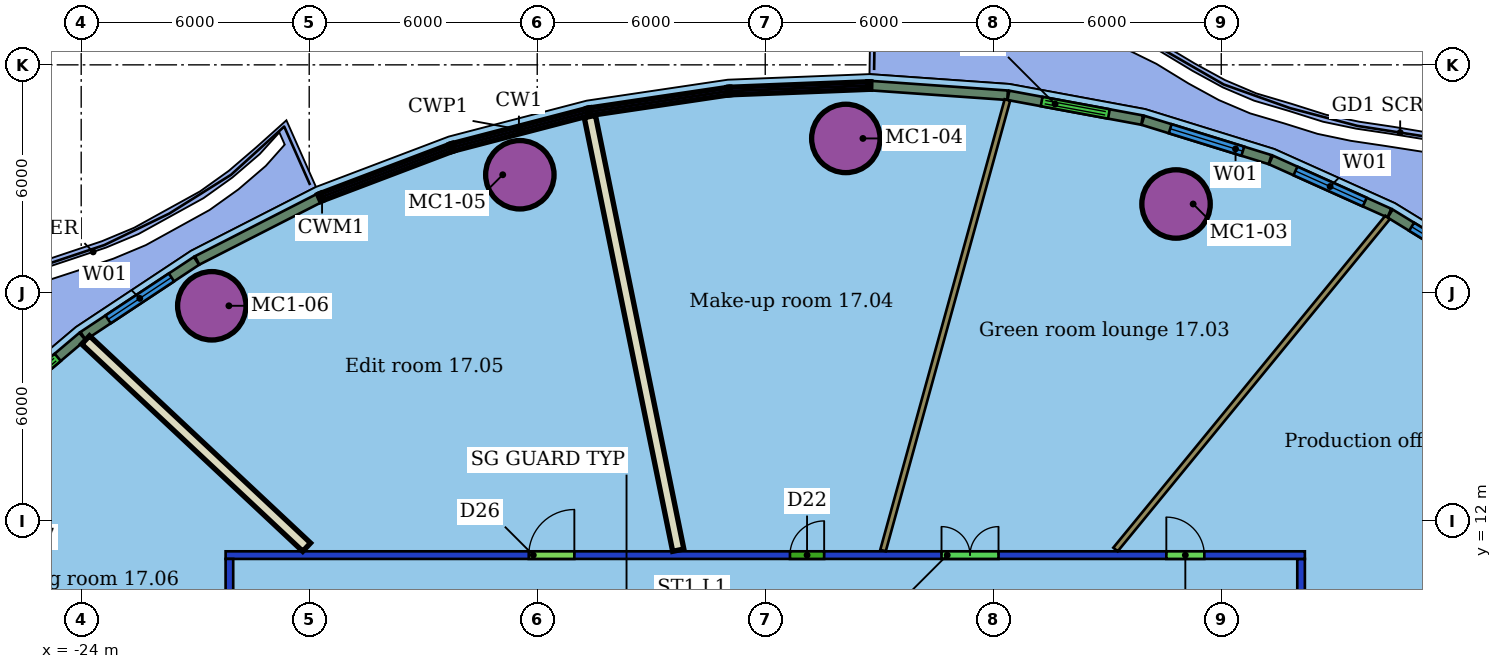
"""IFC4 building model, lengths in metres.
Left out: names, types, materials, properties, quantities, classifications, styles, units other than length and angle.
Written with IfcOpenShell. Run it as: python <this file> out.ifc"""

import sys

from ifc_helpers import new_model, si_unit, direction, frame, frame_2d, origin, origin_2d, place, context, subcontext, project, spatial, rectangle, hollow_circle, extrude, element, fill, save


model = new_model("IFC4")
c1 = context("Model", 3, precision=1e-05, world=origin(), true_north=direction((0.0, 1.0)))
c2 = subcontext(c1, "Body", "Model", "MODEL_VIEW")
j1 = project(units=[si_unit("LENGTHUNIT", "METRE"), si_unit("PLANEANGLEUNIT", "RADIAN")], contexts=[c1])
p1 = place(None, origin())
s1 = spatial("IfcSite", under=j1, at=p1, CompositionType="ELEMENT")
p2 = place(p1, origin())
s2 = spatial("IfcBuilding", under=s1, at=p2, CompositionType="ELEMENT")
p3 = place(p2, frame((0.0, 0.0, 80.4)))
s3 = spatial("IfcBuildingStorey", under=s2, at=p3, CompositionType="ELEMENT", Elevation=80.4)
for number, where, z_axis, x_axis in (
    (1, (4.81, 20.339, 0.0), (0.0, 0.0, 1.0), (1.0, 0.0, 0.0)),
    (2, (-3.879, 22.064, 0.0), (0.0, 0.0, 1.0), (1.0, 0.0, 0.0)),
    (3, (-12.458, 21.108, 0.0), (0.0, 0.0, 1.0), (1.0, 0.0, 0.0)),
    (4, (-20.563, 17.66, 0.0), (0.0, 0.0, 1.0), (1.0, 0.0, 0.0)),
):
    element("IfcColumn", number, at=place(p3, frame(where, z_axis=z_axis, x_axis=x_axis)), inside=s3, PredefinedType="COLUMN", context=c2, shape_type="SweptSolid", body=[
        extrude(hollow_circle(Radius=0.9, WallThickness=0.06, at=origin_2d()), origin(), (0.0, 0.0, 1.0), 3.5),
    ])
p4 = place(p3, frame((-20.1, -11.0, 0.0), z_axis=(0.0, 0.0, 1.0), x_axis=(0.0, 1.0, 0.0)))
e5 = element("IfcWall", 5, at=p4, inside=s3, PredefinedType="PARTITIONING", context=c2, shape_type="SweptSolid", body=[
    extrude(rectangle(XDim=22.0, YDim=0.2, at=frame_2d((11.0, 0.0))), origin(), (0.0, 0.0, 1.0), 2.8),
])
p5 = place(p4, frame((18.0, 0.0, 0.0)))
e6 = element("IfcOpeningElement", 6, at=p5, cuts=e5, PredefinedType="OPENING", context=c2, shape_type="SweptSolid", body=[
    extrude(rectangle(XDim=0.9, YDim=2.1, at=frame_2d((0.45, 1.05))), frame((0.0, 0.11, 0.0), z_axis=(0.0, -1.0, 0.0), x_axis=(1.0, 0.0, 0.0)), (0.0, 0.0, 1.0), 0.22),
])
p6 = place(p4, frame((13.798, 0.0, 0.0)))
e7 = element("IfcOpeningElement", 7, at=p6, cuts=e5, PredefinedType="OPENING", context=c2, shape_type="SweptSolid", body=[
    extrude(rectangle(XDim=1.1, YDim=2.1, at=frame_2d((0.55, 1.05))), frame((0.0, 0.11, 0.0), z_axis=(0.0, -1.0, 0.0), x_axis=(1.0, 0.0, 0.0)), (0.0, 0.0, 1.0), 0.22),
])
p7 = place(p4, frame((8.872, 0.0, 0.0)))
e8 = element("IfcOpeningElement", 8, at=p7, cuts=e5, PredefinedType="OPENING", context=c2, shape_type="SweptSolid", body=[
    extrude(rectangle(XDim=1.2, YDim=2.1, at=frame_2d((0.6, 1.05))), frame((0.0, 0.11, 0.0), z_axis=(0.0, -1.0, 0.0), x_axis=(1.0, 0.0, 0.0)), (0.0, 0.0, 1.0), 0.22),
])
p8 = place(p4, frame((5.6, 0.0, 0.0)))
e9 = element("IfcOpeningElement", 9, at=p8, cuts=e5, PredefinedType="OPENING", context=c2, shape_type="SweptSolid", body=[
    extrude(rectangle(XDim=1.0, YDim=2.1, at=frame_2d((0.5, 1.05))), frame((0.0, 0.11, 0.0), z_axis=(0.0, -1.0, 0.0), x_axis=(1.0, 0.0, 0.0)), (0.0, 0.0, 1.0), 0.22),
])
p9 = place(p3, frame((-20.2, 11.1, 0.0), z_axis=(0.0, 0.0, 1.0), x_axis=(1.0, 0.0, 0.0)))
e10 = element("IfcWall", 10, at=p9, inside=s3, PredefinedType="PARTITIONING", context=c2, shape_type="SweptSolid", body=[
    extrude(rectangle(XDim=28.4, YDim=0.2, at=frame_2d((14.2, 0.0))), origin(), (0.0, 0.0, 1.0), 2.8),
])
p10 = place(p9, frame((24.754, 0.0, 0.0)))
e11 = element("IfcOpeningElement", 11, at=p10, cuts=e10, PredefinedType="OPENING", context=c2, shape_type="SweptSolid", body=[
    extrude(rectangle(XDim=1.0, YDim=2.1, at=frame_2d((0.5, 1.05))), frame((0.0, 0.11, 0.0), z_axis=(0.0, -1.0, 0.0), x_axis=(1.0, 0.0, 0.0)), (0.0, 0.0, 1.0), 0.22),
])
p11 = place(p9, frame((18.838, 0.0, 0.0)))
e12 = element("IfcOpeningElement", 12, at=p11, cuts=e10, PredefinedType="OPENING", context=c2, shape_type="SweptSolid", body=[
    extrude(rectangle(XDim=1.5, YDim=2.1, at=frame_2d((0.75, 1.05))), frame((0.0, 0.11, 0.0), z_axis=(0.0, -1.0, 0.0), x_axis=(1.0, 0.0, 0.0)), (0.0, 0.0, 1.0), 0.22),
])
p12 = place(p9, frame((14.85, 0.0, 0.0)))
e13 = element("IfcOpeningElement", 13, at=p12, cuts=e10, PredefinedType="OPENING", context=c2, shape_type="SweptSolid", body=[
    extrude(rectangle(XDim=0.9, YDim=2.1, at=frame_2d((0.45, 1.05))), frame((0.0, 0.11, 0.0), z_axis=(0.0, -1.0, 0.0), x_axis=(1.0, 0.0, 0.0)), (0.0, 0.0, 1.0), 0.22),
])
p13 = place(p9, frame((7.977, 0.0, 0.0)))
e14 = element("IfcOpeningElement", 14, at=p13, cuts=e10, PredefinedType="OPENING", context=c2, shape_type="SweptSolid", body=[
    extrude(rectangle(XDim=1.2, YDim=2.1, at=frame_2d((0.6, 1.05))), frame((0.0, 0.11, 0.0), z_axis=(0.0, -1.0, 0.0), x_axis=(1.0, 0.0, 0.0)), (0.0, 0.0, 1.0), 0.22),
])
p14 = place(p3, frame((8.1, 11.0, 0.0), z_axis=(0.0, 0.0, 1.0), x_axis=(0.0, -1.0, 0.0)))
e15 = element("IfcWall", 15, at=p14, inside=s3, PredefinedType="PARTITIONING", context=c2, shape_type="SweptSolid", body=[
    extrude(rectangle(XDim=22.0, YDim=0.2, at=frame_2d((11.0, 0.0))), origin(), (0.0, 0.0, 1.0), 2.8),
])
p15 = place(p14, frame((5.63, 0.0, 0.0)))
e16 = element("IfcOpeningElement", 16, at=p15, cuts=e15, PredefinedType="OPENING", context=c2, shape_type="SweptSolid", body=[
    extrude(rectangle(XDim=1.0, YDim=2.1, at=frame_2d((0.5, 1.05))), frame((0.0, 0.11, 0.0), z_axis=(0.0, -1.0, 0.0), x_axis=(1.0, 0.0, 0.0)), (0.0, 0.0, 1.0), 0.22),
])
p16 = place(p14, frame((16.523, 0.0, 0.0)))
e17 = element("IfcOpeningElement", 17, at=p16, cuts=e15, PredefinedType="OPENING", context=c2, shape_type="SweptSolid", body=[
    extrude(rectangle(XDim=1.5, YDim=2.1, at=frame_2d((0.75, 1.05))), frame((0.0, 0.11, 0.0), z_axis=(0.0, -1.0, 0.0), x_axis=(1.0, 0.0, 0.0)), (0.0, 0.0, 1.0), 0.22),
])
p17 = place(p14, frame((12.501, 0.0, 0.0)))
e18 = element("IfcOpeningElement", 18, at=p17, cuts=e15, PredefinedType="OPENING", context=c2, shape_type="SweptSolid", body=[
    extrude(rectangle(XDim=1.1, YDim=2.1, at=frame_2d((0.55, 1.05))), frame((0.0, 0.11, 0.0), z_axis=(0.0, -1.0, 0.0), x_axis=(1.0, 0.0, 0.0)), (0.0, 0.0, 1.0), 0.22),
])
p18 = place(p14, frame((8.782, 0.0, 0.0)))
e19 = element("IfcOpeningElement", 19, at=p18, cuts=e15, PredefinedType="OPENING", context=c2, shape_type="SweptSolid", body=[
    extrude(rectangle(XDim=1.5, YDim=2.1, at=frame_2d((0.75, 1.05))), frame((0.0, 0.11, 0.0), z_axis=(0.0, -1.0, 0.0), x_axis=(1.0, 0.0, 0.0)), (0.0, 0.0, 1.0), 0.22),
])
p19 = place(p3, frame((17.864, 13.859, 0.0), z_axis=(0.0, 0.0, 1.0), x_axis=(-0.864751207242, -0.502200507341, 0.0)))
e20 = element("IfcWall", 20, at=p19, inside=s3, PredefinedType="PARTITIONING", context=c2, shape_type="SweptSolid", body=[
    extrude(rectangle(XDim=11.147, YDim=0.1, at=frame_2d((5.573, 0.0))), origin(), (0.0, 0.0, 1.0), 3.5),
])
p20 = place(p3, frame((10.375, 19.983, 0.0), z_axis=(0.0, 0.0, 1.0), x_axis=(-0.633830873212, -0.773471669916, 0.0)))
e21 = element("IfcWall", 21, at=p20, inside=s3, PredefinedType="PARTITIONING", context=c2, shape_type="SweptSolid", body=[
    extrude(rectangle(XDim=11.294, YDim=0.15, at=frame_2d((5.647, 0.0))), origin(), (0.0, 0.0, 1.0), 3.5),
])
p21 = place(p3, frame((0.373, 23.075, 0.0), z_axis=(0.0, 0.0, 1.0), x_axis=(-0.266208224794, -0.963915546639, 0.0)))
e22 = element("IfcWall", 22, at=p21, inside=s3, PredefinedType="PARTITIONING", context=c2, shape_type="SweptSolid", body=[
    extrude(rectangle(XDim=12.299, YDim=0.15, at=frame_2d((6.15, 0.0))), origin(), (0.0, 0.0, 1.0), 3.5),
])
p22 = place(p3, frame((-10.615, 22.641, 0.0), z_axis=(0.0, 0.0, 1.0), x_axis=(0.19970288829, -0.979856497865, 0.0)))
e23 = element("IfcWall", 23, at=p22, inside=s3, PredefinedType="PARTITIONING", context=c2, shape_type="SweptSolid", body=[
    extrude(rectangle(XDim=11.646, YDim=0.3, at=frame_2d((5.823, 0.0))), origin(), (0.0, 0.0, 1.0), 3.5),
])
p23 = place(p3, frame((-23.884, 16.761, 0.0), z_axis=(0.0, 0.0, 1.0), x_axis=(0.729643205367, -0.683828043343, 0.0)))
e24 = element("IfcWall", 24, at=p23, inside=s3, PredefinedType="PARTITIONING", context=c2, shape_type="SweptSolid", body=[
    extrude(rectangle(XDim=7.972, YDim=0.3, at=frame_2d((3.986, 0.0))), origin(), (0.0, 0.0, 1.0), 3.5),
])
p24 = place(p3, frame((13.278, 18.348, 0.0), z_axis=(0.0, 0.0, 1.0), x_axis=(-0.85230041537, 0.523052580492, 0.0)))
e25 = element("IfcWall", 25, at=p24, inside=s3, PredefinedType="SOLIDWALL", context=c2, shape_type="SweptSolid", body=[
    extrude(rectangle(XDim=3.326, YDim=0.25, at=frame_2d((1.663, 0.0))), origin(), (0.0, 0.0, 1.0), 3.1),
])
p25 = place(p24, frame((0.663, 0.0, 0.8)))
e26 = element("IfcOpeningElement", 26, at=p25, cuts=e25, PredefinedType="OPENING", context=c2, shape_type="SweptSolid", body=[
    extrude(rectangle(XDim=2.0, YDim=2.2, at=frame_2d((1.0, 1.1))), frame((0.0, 0.135, 0.0), z_axis=(0.0, -1.0, 0.0), x_axis=(1.0, 0.0, 0.0)), (0.0, 0.0, 1.0), 0.27),
])
p26 = place(p3, frame((10.423, 20.099, 0.0), z_axis=(0.0, 0.0, 1.0), x_axis=(-0.912234110734, 0.409669290055, 0.0)))
e27 = element("IfcWall", 27, at=p26, inside=s3, PredefinedType="SOLIDWALL", context=c2, shape_type="SweptSolid", body=[
    extrude(rectangle(XDim=3.417, YDim=0.25, at=frame_2d((1.708, 0.0))), origin(), (0.0, 0.0, 1.0), 3.1),
])
p27 = place(p26, frame((0.708, 0.0, 0.8)))
e28 = element("IfcOpeningElement", 28, at=p27, cuts=e27, PredefinedType="OPENING", context=c2, shape_type="SweptSolid", body=[
    extrude(rectangle(XDim=2.0, YDim=2.2, at=frame_2d((1.0, 1.1))), frame((0.0, 0.135, 0.0), z_axis=(0.0, -1.0, 0.0), x_axis=(1.0, 0.0, 0.0)), (0.0, 0.0, 1.0), 0.27),
])
p28 = place(p3, frame((7.284, 21.507, 0.0), z_axis=(0.0, 0.0, 1.0), x_axis=(-0.955359001532, 0.295447420351, 0.0)))
e29 = element("IfcWall", 29, at=p28, inside=s3, PredefinedType="SOLIDWALL", context=c2, shape_type="SweptSolid", body=[
    extrude(rectangle(XDim=3.502, YDim=0.25, at=frame_2d((1.751, 0.0))), origin(), (0.0, 0.0, 1.0), 3.1),
])
p29 = place(p28, frame((0.751, 0.0, 0.8)))
e30 = element("IfcOpeningElement", 30, at=p29, cuts=e29, PredefinedType="OPENING", context=c2, shape_type="SweptSolid", body=[
    extrude(rectangle(XDim=2.0, YDim=2.2, at=frame_2d((1.0, 1.1))), frame((0.0, 0.135, 0.0), z_axis=(0.0, -1.0, 0.0), x_axis=(1.0, 0.0, 0.0)), (0.0, 0.0, 1.0), 0.27),
])
p30 = place(p3, frame((3.917, 22.547, 0.0), z_axis=(0.0, 0.0, 1.0), x_axis=(-0.983303724205, 0.181971937299, 0.0)))
e31 = element("IfcWall", 31, at=p30, inside=s3, PredefinedType="SOLIDWALL", context=c2, shape_type="SweptSolid", body=[
    extrude(rectangle(XDim=3.577, YDim=0.25, at=frame_2d((1.789, 0.0))), origin(), (0.0, 0.0, 1.0), 3.1),
])
p31 = place(p30, frame((0.888, 0.0, 0.0)))
e32 = element("IfcOpeningElement", 32, at=p31, cuts=e31, PredefinedType="OPENING", context=c2, shape_type="SweptSolid", body=[
    extrude(rectangle(XDim=1.8, YDim=2.4, at=frame_2d((0.9, 1.2))), frame((0.0, 0.135, 0.0), z_axis=(0.0, -1.0, 0.0), x_axis=(1.0, 0.0, 0.0)), (0.0, 0.0, 1.0), 0.27),
])
p32 = place(p3, frame((0.377, 23.2, 0.0), z_axis=(0.0, 0.0, 1.0), x_axis=(-0.997533004905, 0.070199032227, 0.0)))
e33 = element("IfcWall", 33, at=p32, inside=s3, PredefinedType="SOLIDWALL", context=c2, shape_type="SweptSolid", body=[
    extrude(rectangle(XDim=3.593, YDim=0.25, at=frame_2d((1.796, 0.0))), origin(), (0.0, 0.0, 1.0), 3.1),
])
p33 = place(p3, frame((-17.75, 20.488, 0.0), z_axis=(0.0, 0.0, 1.0), x_axis=(-0.890478739506, -0.455024850407, 0.0)))
e34 = element("IfcWall", 34, at=p33, inside=s3, PredefinedType="SOLIDWALL", context=c2, shape_type="SweptSolid", body=[
    extrude(rectangle(XDim=3.593, YDim=0.25, at=frame_2d((1.796, 0.0))), origin(), (0.0, 0.0, 1.0), 3.1),
])
p34 = place(p3, frame((-20.968, 18.843, 0.0), z_axis=(0.0, 0.0, 1.0), x_axis=(-0.833653527953, -0.552287783073, 0.0)))
e35 = element("IfcWall", 35, at=p34, inside=s3, PredefinedType="SOLIDWALL", context=c2, shape_type="SweptSolid", body=[
    extrude(rectangle(XDim=3.577, YDim=0.25, at=frame_2d((1.788, 0.0))), origin(), (0.0, 0.0, 1.0), 3.1),
])
p35 = place(p34, frame((0.788, 0.0, 0.8)))
e36 = element("IfcOpeningElement", 36, at=p35, cuts=e35, PredefinedType="OPENING", context=c2, shape_type="SweptSolid", body=[
    extrude(rectangle(XDim=2.0, YDim=2.2, at=frame_2d((1.0, 1.1))), frame((0.0, 0.135, 0.0), z_axis=(0.0, -1.0, 0.0), x_axis=(1.0, 0.0, 0.0)), (0.0, 0.0, 1.0), 0.27),
])
p36 = place(p3, frame((-23.968, 16.854, 0.0), z_axis=(0.0, 0.0, 1.0), x_axis=(-0.76352642001, -0.645776591358, 0.0)))
e37 = element("IfcWall", 37, at=p36, inside=s3, PredefinedType="SOLIDWALL", context=c2, shape_type="SweptSolid", body=[
    extrude(rectangle(XDim=3.502, YDim=0.25, at=frame_2d((1.751, 0.0))), origin(), (0.0, 0.0, 1.0), 3.1),
])
p37 = place(p36, frame((0.851, 0.0, 0.0)))
e38 = element("IfcOpeningElement", 38, at=p37, cuts=e37, PredefinedType="OPENING", context=c2, shape_type="SweptSolid", body=[
    extrude(rectangle(XDim=1.8, YDim=2.4, at=frame_2d((0.9, 1.2))), frame((0.0, 0.135, 0.0), z_axis=(0.0, -1.0, 0.0), x_axis=(1.0, 0.0, 0.0)), (0.0, 0.0, 1.0), 0.27),
])
p38 = place(p10, origin())
e39 = element("IfcDoor", 39, at=p38, inside=s3, OperationType="SINGLE_SWING_LEFT", PredefinedType="DOOR", context=c2, shape_type="SweptSolid", body=[
    extrude(rectangle(XDim=1.0, YDim=2.1, at=frame_2d((0.5, 1.05))), frame((0.0, 0.025, 0.0), z_axis=(0.0, -1.0, 0.0), x_axis=(1.0, 0.0, 0.0)), (0.0, 0.0, 1.0), 0.05),
])
fill(e11, e39)
p39 = place(p11, origin())
e40 = element("IfcDoor", 40, at=p39, inside=s3, OperationType="DOUBLE_DOOR_SINGLE_SWING", PredefinedType="DOOR", context=c2, shape_type="SweptSolid", body=[
    extrude(rectangle(XDim=1.5, YDim=2.1, at=frame_2d((0.75, 1.05))), frame((0.0, 0.025, 0.0), z_axis=(0.0, -1.0, 0.0), x_axis=(1.0, 0.0, 0.0)), (0.0, 0.0, 1.0), 0.05),
])
fill(e12, e40)
p40 = place(p12, origin())
e41 = element("IfcDoor", 41, at=p40, inside=s3, OperationType="SINGLE_SWING_RIGHT", PredefinedType="DOOR", context=c2, shape_type="SweptSolid", body=[
    extrude(rectangle(XDim=0.9, YDim=2.1, at=frame_2d((0.45, 1.05))), frame((0.0, 0.025, 0.0), z_axis=(0.0, -1.0, 0.0), x_axis=(1.0, 0.0, 0.0)), (0.0, 0.0, 1.0), 0.05),
])
fill(e13, e41)
p41 = place(p13, origin())
e42 = element("IfcDoor", 42, at=p41, inside=s3, OperationType="SINGLE_SWING_RIGHT", PredefinedType="DOOR", context=c2, shape_type="SweptSolid", body=[
    extrude(rectangle(XDim=1.2, YDim=2.1, at=frame_2d((0.6, 1.05))), frame((0.0, 0.025, 0.0), z_axis=(0.0, -1.0, 0.0), x_axis=(1.0, 0.0, 0.0)), (0.0, 0.0, 1.0), 0.05),
])
fill(e14, e42)
p42 = place(p25, origin())
e43 = element("IfcWindow", 43, at=p42, inside=s3, PartitioningType="SINGLE_PANEL", PredefinedType="WINDOW", context=c2, shape_type="SweptSolid", body=[
    extrude(rectangle(XDim=2.0, YDim=2.2, at=frame_2d((1.0, 1.1))), frame((0.0, 0.03, 0.0), z_axis=(0.0, -1.0, 0.0), x_axis=(1.0, 0.0, 0.0)), (0.0, 0.0, 1.0), 0.06),
])
fill(e26, e43)
p43 = place(p27, origin())
e44 = element("IfcWindow", 44, at=p43, inside=s3, PartitioningType="SINGLE_PANEL", PredefinedType="WINDOW", context=c2, shape_type="SweptSolid", body=[
    extrude(rectangle(XDim=2.0, YDim=2.2, at=frame_2d((1.0, 1.1))), frame((0.0, 0.03, 0.0), z_axis=(0.0, -1.0, 0.0), x_axis=(1.0, 0.0, 0.0)), (0.0, 0.0, 1.0), 0.06),
])
fill(e28, e44)
p44 = place(p29, origin())
e45 = element("IfcWindow", 45, at=p44, inside=s3, PartitioningType="SINGLE_PANEL", PredefinedType="WINDOW", context=c2, shape_type="SweptSolid", body=[
    extrude(rectangle(XDim=2.0, YDim=2.2, at=frame_2d((1.0, 1.1))), frame((0.0, 0.03, 0.0), z_axis=(0.0, -1.0, 0.0), x_axis=(1.0, 0.0, 0.0)), (0.0, 0.0, 1.0), 0.06),
])
fill(e30, e45)
p45 = place(p31, origin())
e46 = element("IfcDoor", 46, at=p45, inside=s3, OperationType="DOUBLE_DOOR_SLIDING", PredefinedType="DOOR", context=c2, shape_type="SweptSolid", body=[
    extrude(rectangle(XDim=1.8, YDim=2.4, at=frame_2d((0.9, 1.2))), frame((0.0, 0.025, 0.0), z_axis=(0.0, -1.0, 0.0), x_axis=(1.0, 0.0, 0.0)), (0.0, 0.0, 1.0), 0.05),
])
fill(e32, e46)
p46 = place(p35, origin())
e47 = element("IfcWindow", 47, at=p46, inside=s3, PartitioningType="SINGLE_PANEL", PredefinedType="WINDOW", context=c2, shape_type="SweptSolid", body=[
    extrude(rectangle(XDim=2.0, YDim=2.2, at=frame_2d((1.0, 1.1))), frame((0.0, 0.03, 0.0), z_axis=(0.0, -1.0, 0.0), x_axis=(1.0, 0.0, 0.0)), (0.0, 0.0, 1.0), 0.06),
])
fill(e36, e47)
p47 = place(p37, origin())
e48 = element("IfcDoor", 48, at=p47, inside=s3, OperationType="DOUBLE_DOOR_SLIDING", PredefinedType="DOOR", context=c2, shape_type="SweptSolid", body=[
    extrude(rectangle(XDim=1.8, YDim=2.4, at=frame_2d((0.9, 1.2))), frame((0.0, 0.025, 0.0), z_axis=(0.0, -1.0, 0.0), x_axis=(1.0, 0.0, 0.0)), (0.0, 0.0, 1.0), 0.05),
])
fill(e38, e48)
save(model, sys.argv[1])
